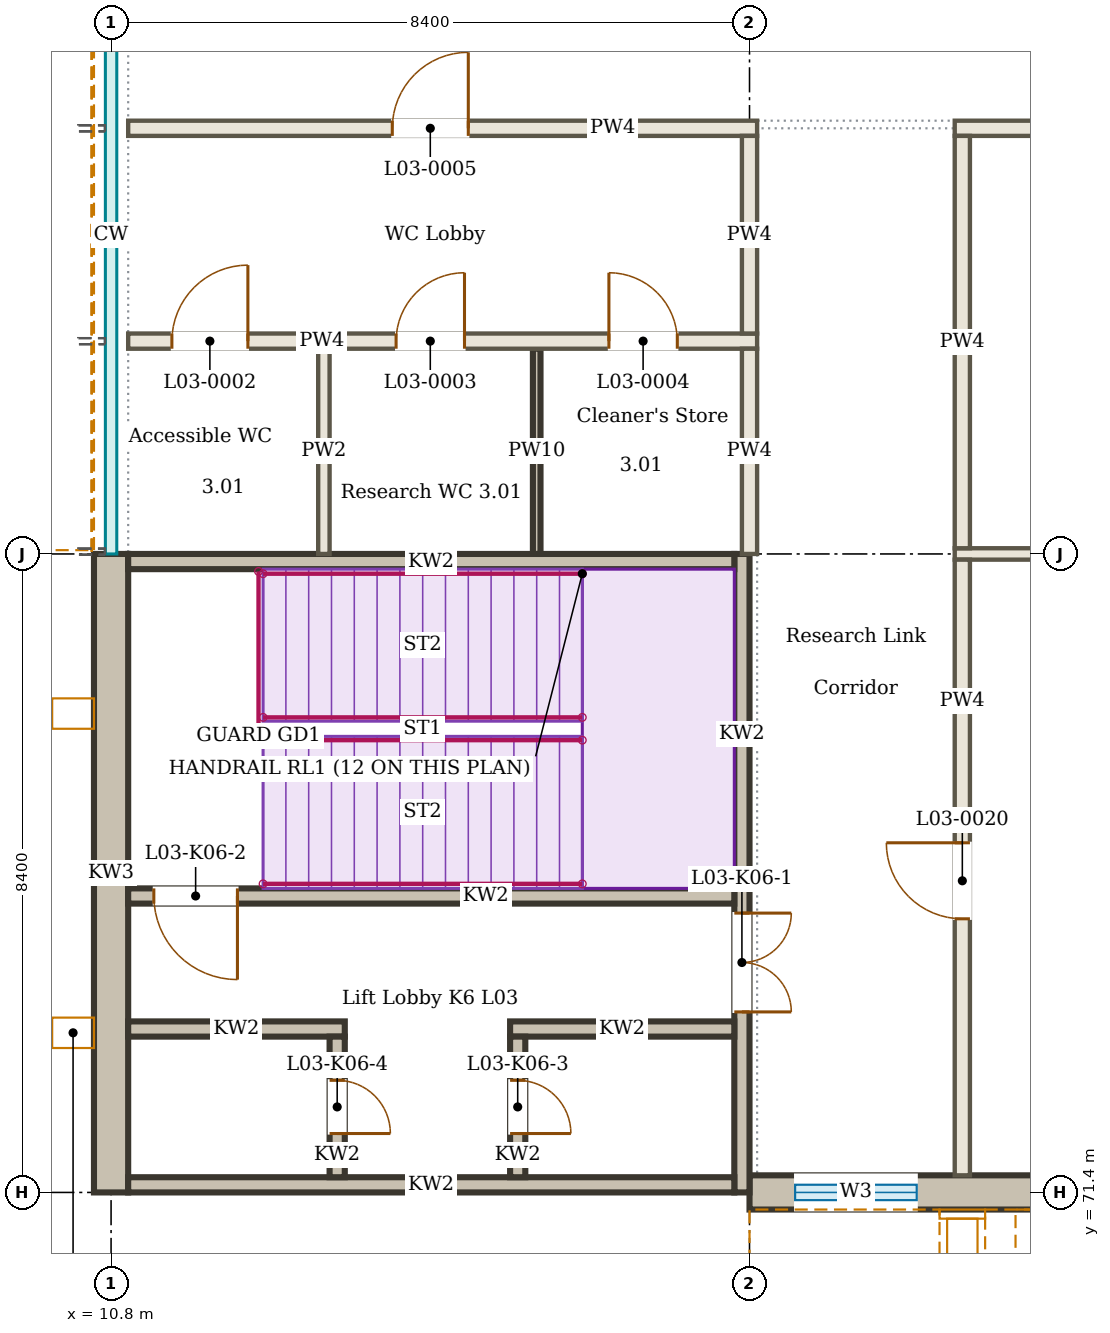
"""IFC4 building model, lengths in metres.
Left out: names, types, materials, properties, quantities, classifications, styles, units other than length and angle.
Written with IfcOpenShell. Run it as: python <this file> out.ifc"""

import sys

from ifc_helpers import new_model, si_unit, direction, frame, frame_2d, origin, place, context, subcontext, project, spatial, rectangle, extrude, element, fill, save


model = new_model("IFC4")
c1 = context("Model", 3, precision=1e-05, world=origin(), true_north=direction((0.0, 1.0)))
c2 = subcontext(c1, "Body", "Model", "MODEL_VIEW")
j1 = project(units=[si_unit("LENGTHUNIT", "METRE"), si_unit("PLANEANGLEUNIT", "RADIAN")], contexts=[c1])
p1 = place(None, origin())
s1 = spatial("IfcSite", under=j1, at=p1, CompositionType="ELEMENT")
p2 = place(p1, origin())
s2 = spatial("IfcBuilding", under=s1, at=p2, CompositionType="ELEMENT")
p3 = place(p2, frame((0.0, 0.0, 13.5)))
s3 = spatial("IfcBuildingStorey", under=s2, at=p3, CompositionType="ELEMENT", Elevation=13.5)
p4 = place(p3, frame((19.2, 71.4, 0.0), z_axis=(0.0, 0.0, 1.0), x_axis=(1.0, 0.0, 0.0)))
e1 = element("IfcWall", 1, at=p4, inside=s3, PredefinedType="SOLIDWALL", context=c2, shape_type="SweptSolid", body=[
    extrude(rectangle(XDim=8.205, YDim=0.45, at=frame_2d((4.102, 0.0))), origin(), (0.0, 0.0, 1.0), 3.85),
])
p5 = place(p4, frame((0.6, 0.0, 2.7)))
e2 = element("IfcOpeningElement", 2, at=p5, cuts=e1, PredefinedType="OPENING", context=c2, shape_type="SweptSolid", body=[
    extrude(rectangle(XDim=1.6, YDim=0.6, at=frame_2d((0.8, 0.3))), frame((0.0, 0.235, 0.0), z_axis=(0.0, -1.0, 0.0), x_axis=(1.0, 0.0, 0.0)), (0.0, 0.0, 1.0), 0.47),
])
p6 = place(p4, frame((3.75, 0.0, 1.0)))
e3 = element("IfcOpeningElement", 3, at=p6, cuts=e1, PredefinedType="OPENING", context=c2, shape_type="SweptSolid", body=[
    extrude(rectangle(XDim=0.9, YDim=1.2, at=frame_2d((0.45, 0.6))), frame((0.0, 0.235, 0.0), z_axis=(0.0, -1.0, 0.0), x_axis=(1.0, 0.0, 0.0)), (0.0, 0.0, 1.0), 0.47),
])
p7 = place(p4, frame((6.55, 0.0, 1.0)))
e4 = element("IfcOpeningElement", 4, at=p7, cuts=e1, PredefinedType="OPENING", context=c2, shape_type="SweptSolid", body=[
    extrude(rectangle(XDim=0.9, YDim=1.2, at=frame_2d((0.45, 0.6))), frame((0.0, 0.235, 0.0), z_axis=(0.0, -1.0, 0.0), x_axis=(1.0, 0.0, 0.0)), (0.0, 0.0, 1.0), 0.47),
])
p8 = place(p3, frame((19.2, 71.24, 3.87), z_axis=(0.0, 0.0, 1.0), x_axis=(1.0, 0.0, 0.0)))
e5 = element("IfcWall", 5, at=p8, inside=s3, PredefinedType="SOLIDWALL", context=c2, shape_type="SweptSolid", body=[
    extrude(rectangle(XDim=8.205, YDim=0.13, at=frame_2d((4.102, 0.0))), origin(), (0.0, 0.0, 1.0), 0.63),
])
p9 = place(p3, frame((10.64, 79.8, 3.87), z_axis=(0.0, 0.0, 1.0), x_axis=(0.0, 1.0, 0.0)))
e6 = element("IfcWall", 6, at=p9, inside=s3, PredefinedType="SOLIDWALL", context=c2, shape_type="SweptSolid", body=[
    extrude(rectangle(XDim=8.4, YDim=0.13, at=frame_2d((4.2, 0.0))), origin(), (0.0, 0.0, 1.0), 0.63),
])
p10 = place(p3, frame((21.9, 79.8, 0.0), z_axis=(0.0, 0.0, 1.0), x_axis=(1.0, 0.0, 0.0)))
e7 = element("IfcWall", 7, at=p10, inside=s3, PredefinedType="PARTITIONING", context=c2, shape_type="SweptSolid", body=[
    extrude(rectangle(XDim=5.505, YDim=0.15, at=frame_2d((2.752, 0.0))), origin(), (0.0, 0.0, 1.0), 3.8),
])
p11 = place(p3, frame((11.025, 82.6, 0.0), z_axis=(0.0, 0.0, 1.0), x_axis=(1.0, 0.0, 0.0)))
e8 = element("IfcWall", 8, at=p11, inside=s3, PredefinedType="PARTITIONING", context=c2, shape_type="SweptSolid", body=[
    extrude(rectangle(XDim=8.275, YDim=0.2, at=frame_2d((4.138, 0.0))), origin(), (0.0, 0.0, 1.0), 3.8),
])
p12 = place(p11, frame((0.575, 0.0, 0.0)))
e9 = element("IfcOpeningElement", 9, at=p12, cuts=e8, PredefinedType="OPENING", context=c2, shape_type="SweptSolid", body=[
    extrude(rectangle(XDim=1.0, YDim=2.1, at=frame_2d((0.5, 1.05))), frame((0.0, 0.11, 0.0), z_axis=(0.0, -1.0, 0.0), x_axis=(1.0, 0.0, 0.0)), (0.0, 0.0, 1.0), 0.22),
])
p13 = place(p11, frame((3.525, 0.0, 0.0)))
e10 = element("IfcOpeningElement", 10, at=p13, cuts=e8, PredefinedType="OPENING", context=c2, shape_type="SweptSolid", body=[
    extrude(rectangle(XDim=0.9, YDim=2.1, at=frame_2d((0.45, 1.05))), frame((0.0, 0.11, 0.0), z_axis=(0.0, -1.0, 0.0), x_axis=(1.0, 0.0, 0.0)), (0.0, 0.0, 1.0), 0.22),
])
p14 = place(p11, frame((6.325, 0.0, 0.0)))
e11 = element("IfcOpeningElement", 11, at=p14, cuts=e8, PredefinedType="OPENING", context=c2, shape_type="SweptSolid", body=[
    extrude(rectangle(XDim=0.9, YDim=2.1, at=frame_2d((0.45, 1.05))), frame((0.0, 0.11, 0.0), z_axis=(0.0, -1.0, 0.0), x_axis=(1.0, 0.0, 0.0)), (0.0, 0.0, 1.0), 0.22),
])
p15 = place(p3, frame((11.025, 85.4, 0.0), z_axis=(0.0, 0.0, 1.0), x_axis=(1.0, 0.0, 0.0)))
e12 = element("IfcWall", 12, at=p15, inside=s3, PredefinedType="PARTITIONING", context=c2, shape_type="SweptSolid", body=[
    extrude(rectangle(XDim=8.275, YDim=0.2, at=frame_2d((4.138, 0.0))), origin(), (0.0, 0.0, 1.0), 3.8),
])
p16 = place(p15, frame((3.475, 0.0, 0.0)))
e13 = element("IfcOpeningElement", 13, at=p16, cuts=e12, PredefinedType="OPENING", context=c2, shape_type="SweptSolid", body=[
    extrude(rectangle(XDim=1.0, YDim=2.1, at=frame_2d((0.5, 1.05))), frame((0.0, 0.11, 0.0), z_axis=(0.0, -1.0, 0.0), x_axis=(1.0, 0.0, 0.0)), (0.0, 0.0, 1.0), 0.22),
])
p17 = place(p3, frame((21.9, 85.4, 0.0), z_axis=(0.0, 0.0, 1.0), x_axis=(1.0, 0.0, 0.0)))
e14 = element("IfcWall", 14, at=p17, inside=s3, PredefinedType="PARTITIONING", context=c2, shape_type="SweptSolid", body=[
    extrude(rectangle(XDim=22.275, YDim=0.2, at=frame_2d((11.138, 0.0))), origin(), (0.0, 0.0, 1.0), 3.8),
])
p18 = place(p17, frame((10.7, 0.0, 0.0)))
e15 = element("IfcOpeningElement", 15, at=p18, cuts=e14, PredefinedType="OPENING", context=c2, shape_type="SweptSolid", body=[
    extrude(rectangle(XDim=1.0, YDim=2.1, at=frame_2d((0.5, 1.05))), frame((0.0, 0.11, 0.0), z_axis=(0.0, -1.0, 0.0), x_axis=(1.0, 0.0, 0.0)), (0.0, 0.0, 1.0), 0.22),
])
p19 = place(p3, frame((13.6, 79.8, 0.0), z_axis=(0.0, 0.0, 1.0), x_axis=(0.0, 1.0, 0.0)))
e16 = element("IfcWall", 16, at=p19, inside=s3, PredefinedType="PARTITIONING", context=c2, shape_type="SweptSolid", body=[
    extrude(rectangle(XDim=2.7, YDim=0.15, at=frame_2d((1.35, 0.0))), origin(), (0.0, 0.0, 1.0), 3.95),
])
p20 = place(p3, frame((16.4, 79.8, 0.0), z_axis=(0.0, 0.0, 1.0), x_axis=(0.0, 1.0, 0.0)))
e17 = element("IfcWall", 17, at=p20, inside=s3, PredefinedType="SOLIDWALL", context=c2, shape_type="SweptSolid", body=[
    extrude(rectangle(XDim=2.7, YDim=0.1, at=frame_2d((1.35, 0.0))), origin(), (0.0, 0.0, 1.0), 3.95),
])
p21 = place(p3, frame((19.2, 79.8, 0.0), z_axis=(0.0, 0.0, 1.0), x_axis=(0.0, 1.0, 0.0)))
e18 = element("IfcWall", 18, at=p21, inside=s3, PredefinedType="PARTITIONING", context=c2, shape_type="SweptSolid", body=[
    extrude(rectangle(XDim=2.7, YDim=0.2, at=frame_2d((1.35, 0.0))), origin(), (0.0, 0.0, 1.0), 3.8),
])
p22 = place(p3, frame((19.2, 82.7, 0.0), z_axis=(0.0, 0.0, 1.0), x_axis=(0.0, 1.0, 0.0)))
e19 = element("IfcWall", 19, at=p22, inside=s3, PredefinedType="PARTITIONING", context=c2, shape_type="SweptSolid", body=[
    extrude(rectangle(XDim=2.6, YDim=0.2, at=frame_2d((1.3, 0.0))), origin(), (0.0, 0.0, 1.0), 3.8),
])
p23 = place(p3, frame((22.0, 71.625, 0.0), z_axis=(0.0, 0.0, 1.0), x_axis=(0.0, 1.0, 0.0)))
e20 = element("IfcWall", 20, at=p23, inside=s3, PredefinedType="PARTITIONING", context=c2, shape_type="SweptSolid", body=[
    extrude(rectangle(XDim=8.1, YDim=0.2, at=frame_2d((4.05, 0.0))), origin(), (0.0, 0.0, 1.0), 3.8),
])
p24 = place(p23, frame((3.375, 0.0, 0.0)))
e21 = element("IfcOpeningElement", 21, at=p24, cuts=e20, PredefinedType="OPENING", context=c2, shape_type="SweptSolid", body=[
    extrude(rectangle(XDim=1.0, YDim=2.1, at=frame_2d((0.5, 1.05))), frame((0.0, 0.11, 0.0), z_axis=(0.0, -1.0, 0.0), x_axis=(1.0, 0.0, 0.0)), (0.0, 0.0, 1.0), 0.22),
])
p25 = place(p3, frame((22.0, 79.875, 0.0), z_axis=(0.0, 0.0, 1.0), x_axis=(0.0, 1.0, 0.0)))
e22 = element("IfcWall", 22, at=p25, inside=s3, PredefinedType="PARTITIONING", context=c2, shape_type="SweptSolid", body=[
    extrude(rectangle(XDim=5.425, YDim=0.2, at=frame_2d((2.712, 0.0))), origin(), (0.0, 0.0, 1.0), 3.8),
])
p26 = place(p3, frame((19.1, 79.8, 0.0), z_axis=(0.0, 0.0, 1.0), x_axis=(0.0, -1.0, 0.0)))
e23 = element("IfcWall", 23, at=p26, inside=s3, PredefinedType="SOLIDWALL", context=c2, shape_type="SweptSolid", body=[
    extrude(rectangle(XDim=8.4, YDim=0.2, at=frame_2d((4.2, 0.0))), origin(), (0.0, 0.0, 1.0), 4.5),
])
p27 = place(p26, frame((4.725, 0.0, 0.0)))
e24 = element("IfcOpeningElement", 24, at=p27, cuts=e23, PredefinedType="OPENING", context=c2, shape_type="SweptSolid", body=[
    extrude(rectangle(XDim=1.3, YDim=2.1, at=frame_2d((0.65, 1.05))), frame((0.0, 0.11, 0.0), z_axis=(0.0, -1.0, 0.0), x_axis=(1.0, 0.0, 0.0)), (0.0, 0.0, 1.0), 0.22),
])
p28 = place(p3, frame((10.8, 79.8, 0.0), z_axis=(0.0, 0.0, 1.0), x_axis=(0.0, -1.0, 0.0)))
e25 = element("IfcWall", 25, at=p28, inside=s3, PredefinedType="SOLIDWALL", context=c2, shape_type="SweptSolid", body=[
    extrude(rectangle(XDim=8.4, YDim=0.45, at=frame_2d((4.2, 0.0))), origin(), (0.0, 0.0, 1.0), 4.5),
])
for number, where, z_axis, x_axis in (
    (26, (19.0, 79.7, 0.0), (0.0, 0.0, 1.0), (-1.0, 0.0, 0.0)),
    (27, (19.0, 71.5, 0.0), (0.0, 0.0, 1.0), (-1.0, 0.0, 0.0)),
):
    element("IfcWall", number, at=place(p3, frame(where, z_axis=z_axis, x_axis=x_axis)), inside=s3, PredefinedType="SOLIDWALL", context=c2, shape_type="SweptSolid", body=[
        extrude(rectangle(XDim=7.975, YDim=0.2, at=frame_2d((3.988, 0.0))), origin(), (0.0, 0.0, 1.0), 4.5),
    ])
p29 = place(p3, frame((19.0, 75.3, 0.0), z_axis=(0.0, 0.0, 1.0), x_axis=(-1.0, 0.0, 0.0)))
e28 = element("IfcWall", 28, at=p29, inside=s3, PredefinedType="SOLIDWALL", context=c2, shape_type="SweptSolid", body=[
    extrude(rectangle(XDim=7.975, YDim=0.2, at=frame_2d((3.988, 0.0))), origin(), (0.0, 0.0, 1.0), 4.5),
])
p30 = place(p29, frame((6.538, 0.0, 0.0)))
e29 = element("IfcOpeningElement", 29, at=p30, cuts=e28, PredefinedType="OPENING", context=c2, shape_type="SweptSolid", body=[
    extrude(rectangle(XDim=1.1, YDim=2.1, at=frame_2d((0.55, 1.05))), frame((0.0, 0.11, 0.0), z_axis=(0.0, -1.0, 0.0), x_axis=(1.0, 0.0, 0.0)), (0.0, 0.0, 1.0), 0.22),
])
p31 = place(p3, frame((19.0, 73.55, 0.0), z_axis=(0.0, 0.0, 1.0), x_axis=(-1.0, 0.0, 0.0)))
e30 = element("IfcWall", 30, at=p31, inside=s3, PredefinedType="SOLIDWALL", context=c2, shape_type="SweptSolid", body=[
    extrude(rectangle(XDim=2.95, YDim=0.2, at=frame_2d((1.475, 0.0))), origin(), (0.0, 0.0, 1.0), 4.35),
])
p32 = place(p3, frame((13.875, 73.55, 0.0), z_axis=(0.0, 0.0, 1.0), x_axis=(-1.0, 0.0, 0.0)))
e31 = element("IfcWall", 31, at=p32, inside=s3, PredefinedType="SOLIDWALL", context=c2, shape_type="SweptSolid", body=[
    extrude(rectangle(XDim=2.85, YDim=0.2, at=frame_2d((1.425, 0.0))), origin(), (0.0, 0.0, 1.0), 4.35),
])
p33 = place(p3, frame((16.15, 73.45, 0.0), z_axis=(0.0, 0.0, 1.0), x_axis=(0.0, -1.0, 0.0)))
e32 = element("IfcWall", 32, at=p33, inside=s3, PredefinedType="SOLIDWALL", context=c2, shape_type="SweptSolid", body=[
    extrude(rectangle(XDim=1.85, YDim=0.2, at=frame_2d((0.925, 0.0))), origin(), (0.0, 0.0, 1.0), 4.35),
])
p34 = place(p33, frame((0.575, 0.0, 0.0)))
e33 = element("IfcOpeningElement", 33, at=p34, cuts=e32, PredefinedType="OPENING", context=c2, shape_type="SweptSolid", body=[
    extrude(rectangle(XDim=0.7, YDim=2.1, at=frame_2d((0.35, 1.05))), frame((0.0, 0.11, 0.0), z_axis=(0.0, -1.0, 0.0), x_axis=(1.0, 0.0, 0.0)), (0.0, 0.0, 1.0), 0.22),
])
p35 = place(p3, frame((13.775, 73.45, 0.0), z_axis=(0.0, 0.0, 1.0), x_axis=(0.0, -1.0, 0.0)))
e34 = element("IfcWall", 34, at=p35, inside=s3, PredefinedType="SOLIDWALL", context=c2, shape_type="SweptSolid", body=[
    extrude(rectangle(XDim=1.85, YDim=0.2, at=frame_2d((0.925, 0.0))), origin(), (0.0, 0.0, 1.0), 4.35),
])
p36 = place(p35, frame((0.575, 0.0, 0.0)))
e35 = element("IfcOpeningElement", 35, at=p36, cuts=e34, PredefinedType="OPENING", context=c2, shape_type="SweptSolid", body=[
    extrude(rectangle(XDim=0.7, YDim=2.1, at=frame_2d((0.35, 1.05))), frame((0.0, 0.11, 0.0), z_axis=(0.0, -1.0, 0.0), x_axis=(1.0, 0.0, 0.0)), (0.0, 0.0, 1.0), 0.22),
])
p37 = place(p5, origin())
e36 = element("IfcWindow", 36, at=p37, inside=s3, PartitioningType="SINGLE_PANEL", PredefinedType="WINDOW", context=c2, shape_type="SweptSolid", body=[
    extrude(rectangle(XDim=1.6, YDim=0.6, at=frame_2d((0.8, 0.3))), frame((0.0, 0.03, 0.0), z_axis=(0.0, -1.0, 0.0), x_axis=(1.0, 0.0, 0.0)), (0.0, 0.0, 1.0), 0.06),
])
fill(e2, e36)
p38 = place(p12, origin())
e37 = element("IfcDoor", 37, at=p38, inside=s3, OperationType="SINGLE_SWING_RIGHT", PredefinedType="DOOR", context=c2, shape_type="SweptSolid", body=[
    extrude(rectangle(XDim=1.0, YDim=2.1, at=frame_2d((0.5, 1.05))), frame((0.0, 0.025, 0.0), z_axis=(0.0, -1.0, 0.0), x_axis=(1.0, 0.0, 0.0)), (0.0, 0.0, 1.0), 0.05),
])
fill(e9, e37)
p39 = place(p13, origin())
e38 = element("IfcDoor", 38, at=p39, inside=s3, OperationType="SINGLE_SWING_RIGHT", PredefinedType="DOOR", context=c2, shape_type="SweptSolid", body=[
    extrude(rectangle(XDim=0.9, YDim=2.1, at=frame_2d((0.45, 1.05))), frame((0.0, 0.025, 0.0), z_axis=(0.0, -1.0, 0.0), x_axis=(1.0, 0.0, 0.0)), (0.0, 0.0, 1.0), 0.05),
])
fill(e10, e38)
p40 = place(p14, origin())
e39 = element("IfcDoor", 39, at=p40, inside=s3, OperationType="SINGLE_SWING_LEFT", PredefinedType="DOOR", context=c2, shape_type="SweptSolid", body=[
    extrude(rectangle(XDim=0.9, YDim=2.1, at=frame_2d((0.45, 1.05))), frame((0.0, 0.025, 0.0), z_axis=(0.0, -1.0, 0.0), x_axis=(1.0, 0.0, 0.0)), (0.0, 0.0, 1.0), 0.05),
])
fill(e11, e39)
p41 = place(p16, origin())
e40 = element("IfcDoor", 40, at=p41, inside=s3, OperationType="SINGLE_SWING_RIGHT", PredefinedType="DOOR", context=c2, shape_type="SweptSolid", body=[
    extrude(rectangle(XDim=1.0, YDim=2.1, at=frame_2d((0.5, 1.05))), frame((0.0, 0.025, 0.0), z_axis=(0.0, -1.0, 0.0), x_axis=(1.0, 0.0, 0.0)), (0.0, 0.0, 1.0), 0.05),
])
fill(e13, e40)
p42 = place(p24, origin())
e41 = element("IfcDoor", 41, at=p42, inside=s3, OperationType="SINGLE_SWING_RIGHT", PredefinedType="DOOR", context=c2, shape_type="SweptSolid", body=[
    extrude(rectangle(XDim=1.0, YDim=2.1, at=frame_2d((0.5, 1.05))), frame((0.0, 0.025, 0.0), z_axis=(0.0, -1.0, 0.0), x_axis=(1.0, 0.0, 0.0)), (0.0, 0.0, 1.0), 0.05),
])
fill(e21, e41)
p43 = place(p27, origin())
e42 = element("IfcDoor", 42, at=p43, inside=s3, OperationType="DOUBLE_DOOR_DOUBLE_SWING", PredefinedType="DOOR", context=c2, shape_type="SweptSolid", body=[
    extrude(rectangle(XDim=1.3, YDim=2.1, at=frame_2d((0.65, 1.05))), frame((0.0, 0.025, 0.0), z_axis=(0.0, -1.0, 0.0), x_axis=(1.0, 0.0, 0.0)), (0.0, 0.0, 1.0), 0.05),
])
fill(e24, e42)
p44 = place(p30, origin())
e43 = element("IfcDoor", 43, at=p44, inside=s3, OperationType="SINGLE_SWING_LEFT", PredefinedType="DOOR", context=c2, shape_type="SweptSolid", body=[
    extrude(rectangle(XDim=1.1, YDim=2.1, at=frame_2d((0.55, 1.05))), frame((0.0, 0.025, 0.0), z_axis=(0.0, -1.0, 0.0), x_axis=(1.0, 0.0, 0.0)), (0.0, 0.0, 1.0), 0.05),
])
fill(e29, e43)
p45 = place(p34, origin())
e44 = element("IfcDoor", 44, at=p45, inside=s3, OperationType="SINGLE_SWING_RIGHT", PredefinedType="DOOR", context=c2, shape_type="SweptSolid", body=[
    extrude(rectangle(XDim=0.7, YDim=2.1, at=frame_2d((0.35, 1.05))), frame((0.0, 0.025, 0.0), z_axis=(0.0, -1.0, 0.0), x_axis=(1.0, 0.0, 0.0)), (0.0, 0.0, 1.0), 0.05),
])
fill(e33, e44)
p46 = place(p36, origin())
e45 = element("IfcDoor", 45, at=p46, inside=s3, OperationType="SINGLE_SWING_RIGHT", PredefinedType="DOOR", context=c2, shape_type="SweptSolid", body=[
    extrude(rectangle(XDim=0.7, YDim=2.1, at=frame_2d((0.35, 1.05))), frame((0.0, 0.025, 0.0), z_axis=(0.0, -1.0, 0.0), x_axis=(1.0, 0.0, 0.0)), (0.0, 0.0, 1.0), 0.05),
])
fill(e35, e45)
save(model, sys.argv[1])
